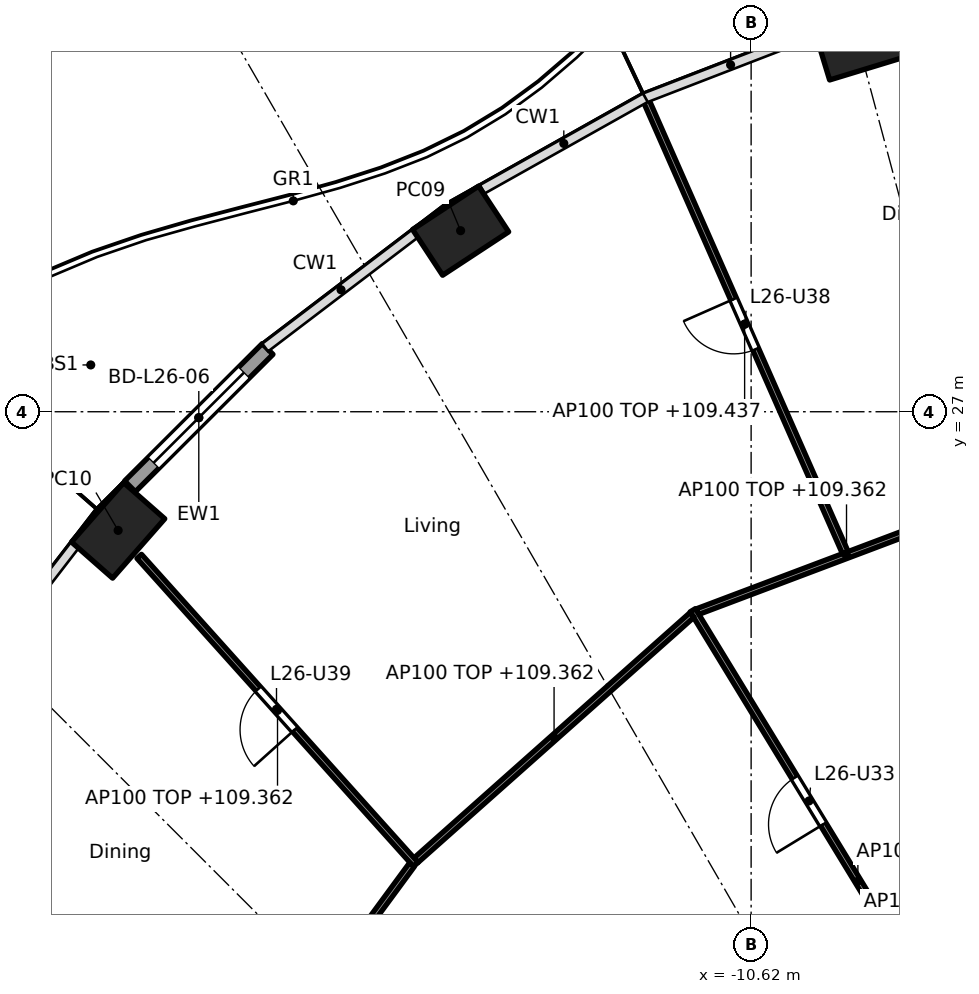
"""IFC4 building model, lengths in metres.
Left out: names, types, materials, properties, quantities, classifications, styles, units other than length and angle.
Written with IfcOpenShell. Run it as: python <this file> out.ifc"""

import sys

from ifc_helpers import new_model, si_unit, direction, frame, frame_2d, origin, origin_2d, place, context, subcontext, project, spatial, rectangle, hollow_rectangle, extrude, element, fill, save


model = new_model("IFC4")
c1 = context("Model", 3, precision=1e-05, world=origin(), true_north=direction((0.0, 1.0)))
c2 = subcontext(c1, "Body", "Model", "MODEL_VIEW")
j1 = project(units=[si_unit("LENGTHUNIT", "METRE"), si_unit("PLANEANGLEUNIT", "RADIAN")], contexts=[c1])
p1 = place(None, origin())
s1 = spatial("IfcSite", under=j1, at=p1, CompositionType="ELEMENT")
p2 = place(p1, origin())
s2 = spatial("IfcBuilding", under=s1, at=p2, CompositionType="ELEMENT")
p3 = place(p2, frame((0.0, 0.0, 106.6)))
s3 = spatial("IfcBuildingStorey", under=s2, at=p3, CompositionType="ELEMENT", Elevation=106.6)
for number, where, z_axis, x_axis in (
    (1, (-8.839, 33.076, 0.0), (0.0, 0.0, 1.0), (-0.957, -0.292, 0.0)),
    (2, (-15.397, 29.978, 0.0), (0.0, 0.0, 1.0), (-0.836, -0.549, 0.0)),
    (3, (-21.03, 25.049, 0.0), (0.0, 0.0, 1.0), (-0.66, -0.751, 0.0)),
):
    element("IfcColumn", number, at=place(p3, frame(where, z_axis=z_axis, x_axis=x_axis)), inside=s3, PredefinedType="COLUMN", context=c2, shape_type="SweptSolid", body=[
        extrude(hollow_rectangle(XDim=1.3, YDim=0.9, WallThickness=0.045, at=origin_2d()), origin(), (0.0, 0.0, 1.0), 3.7),
    ])
p4 = place(p3, frame((-20.835, 25.773, 0.0), z_axis=(0.0, 0.0, 1.0), x_axis=(0.707831646613, 0.706381171927, 0.0)))
e4 = element("IfcWall", 4, at=p4, inside=s3, PredefinedType="SOLIDWALL", context=c2, shape_type="SweptSolid", body=[
    extrude(rectangle(XDim=3.198, YDim=0.25, at=frame_2d((1.599, 0.0))), origin(), (0.0, 0.0, 1.0), 3.44),
])
p5 = place(p4, frame((0.549, 0.0, 0.0)))
e5 = element("IfcOpeningElement", 5, at=p5, cuts=e4, PredefinedType="OPENING", context=c2, shape_type="SweptSolid", body=[
    extrude(rectangle(XDim=2.1, YDim=2.4, at=frame_2d((1.05, 1.2))), frame((0.0, 0.135, 0.0), z_axis=(0.0, -1.0, 0.0), x_axis=(1.0, 0.0, 0.0)), (0.0, 0.0, 1.0), 0.27),
])
p6 = place(p3, frame((-6.596, 25.563, 0.0), z_axis=(0.0, 0.0, 1.0), x_axis=(-0.9356162121, -0.353018843201, 0.0)))
e6 = element("IfcWall", 6, at=p6, inside=s3, PredefinedType="PARTITIONING", context=c2, shape_type="SweptSolid", body=[
    extrude(rectangle(XDim=5.249, YDim=0.1, at=frame_2d((2.625, 0.0))), origin(), (0.0, 0.0, 1.0), 2.762),
])
p7 = place(p3, frame((-9.072, 24.683, 0.0), z_axis=(0.0, 0.0, 1.0), x_axis=(-0.403192911159, 0.915115007194, 0.0)))
e7 = element("IfcWall", 7, at=p7, inside=s3, PredefinedType="PARTITIONING", context=c2, shape_type="SweptSolid", body=[
    extrude(rectangle(XDim=8.211, YDim=0.1, at=frame_2d((4.106, 0.0))), origin(), (0.0, 0.0, 1.0), 2.837),
])
p8 = place(p7, frame((3.656, 0.0, 0.0)))
e8 = element("IfcOpeningElement", 8, at=p8, cuts=e7, PredefinedType="OPENING", context=c2, shape_type="SweptSolid", body=[
    extrude(rectangle(XDim=0.9, YDim=2.1, at=frame_2d((0.45, 1.05))), frame((0.0, 0.06, 0.0), z_axis=(0.0, -1.0, 0.0), x_axis=(1.0, 0.0, 0.0)), (0.0, 0.0, 1.0), 0.12),
])
p9 = place(p3, frame((-6.149, 14.825, 0.0), z_axis=(0.0, 0.0, 1.0), x_axis=(-0.520411490252, 0.853915616917, 0.0)))
e9 = element("IfcWall", 9, at=p9, inside=s3, PredefinedType="PARTITIONING", context=c2, shape_type="SweptSolid", body=[
    extrude(rectangle(XDim=10.435, YDim=0.1, at=frame_2d((5.218, 0.0))), origin(), (0.0, 0.0, 1.0), 3.44),
])
p10 = place(p9, frame((1.582, 0.0, 0.0)))
e10 = element("IfcOpeningElement", 10, at=p10, cuts=e9, PredefinedType="OPENING", context=c2, shape_type="SweptSolid", body=[
    extrude(rectangle(XDim=0.9, YDim=2.1, at=frame_2d((0.45, 1.05))), frame((0.0, 0.06, 0.0), z_axis=(0.0, -1.0, 0.0), x_axis=(1.0, 0.0, 0.0)), (0.0, 0.0, 1.0), 0.12),
])
p11 = place(p9, frame((6.312, 0.0, 0.0)))
e11 = element("IfcOpeningElement", 11, at=p11, cuts=e9, PredefinedType="OPENING", context=c2, shape_type="SweptSolid", body=[
    extrude(rectangle(XDim=0.9, YDim=2.1, at=frame_2d((0.45, 1.05))), frame((0.0, 0.06, 0.0), z_axis=(0.0, -1.0, 0.0), x_axis=(1.0, 0.0, 0.0)), (0.0, 0.0, 1.0), 0.12),
])
p12 = place(p3, frame((-11.591, 23.66, 0.0), z_axis=(0.0, 0.0, 1.0), x_axis=(-0.747429278403, -0.664341383466, 0.0)))
e12 = element("IfcWall", 12, at=p12, inside=s3, PredefinedType="PARTITIONING", context=c2, shape_type="SweptSolid", body=[
    extrude(rectangle(XDim=6.073, YDim=0.1, at=frame_2d((3.037, 0.0))), origin(), (0.0, 0.0, 1.0), 2.762),
])
p13 = place(p3, frame((-16.134, 19.554, 0.0), z_axis=(0.0, 0.0, 1.0), x_axis=(-0.667985610263, 0.74417418961, 0.0)))
e13 = element("IfcWall", 13, at=p13, inside=s3, PredefinedType="PARTITIONING", context=c2, shape_type="SweptSolid", body=[
    extrude(rectangle(XDim=6.809, YDim=0.1, at=frame_2d((3.405, 0.0))), origin(), (0.0, 0.0, 1.0), 2.762),
])
p14 = place(p13, frame((2.98, 0.0, 0.0)))
e14 = element("IfcOpeningElement", 14, at=p14, cuts=e13, PredefinedType="OPENING", context=c2, shape_type="SweptSolid", body=[
    extrude(rectangle(XDim=0.9, YDim=2.1, at=frame_2d((0.45, 1.05))), frame((0.0, 0.06, 0.0), z_axis=(0.0, -1.0, 0.0), x_axis=(1.0, 0.0, 0.0)), (0.0, 0.0, 1.0), 0.12),
])
p15 = place(p3, frame((-16.197, 19.551, 0.0), z_axis=(0.0, 0.0, 1.0), x_axis=(-0.592391983588, -0.80564988536, 0.0)))
e15 = element("IfcWall", 15, at=p15, inside=s3, PredefinedType="PARTITIONING", context=c2, shape_type="SweptSolid", body=[
    extrude(rectangle(XDim=6.08, YDim=0.1, at=frame_2d((3.04, 0.0))), origin(), (0.0, 0.0, 1.0), 2.762),
])
p16 = place(p5, origin())
e16 = element("IfcDoor", 16, at=p16, inside=s3, OperationType="SLIDING_TO_LEFT", PredefinedType="DOOR", context=c2, shape_type="SweptSolid", body=[
    extrude(rectangle(XDim=2.1, YDim=2.4, at=frame_2d((1.05, 1.2))), frame((0.0, 0.025, 0.0), z_axis=(0.0, -1.0, 0.0), x_axis=(1.0, 0.0, 0.0)), (0.0, 0.0, 1.0), 0.05),
])
fill(e5, e16)
p17 = place(p11, origin())
e17 = element("IfcDoor", 17, at=p17, inside=s3, OperationType="SINGLE_SWING_LEFT", PredefinedType="DOOR", context=c2, shape_type="SweptSolid", body=[
    extrude(rectangle(XDim=0.9, YDim=2.1, at=frame_2d((0.45, 1.05))), frame((0.0, 0.025, 0.0), z_axis=(0.0, -1.0, 0.0), x_axis=(1.0, 0.0, 0.0)), (0.0, 0.0, 1.0), 0.05),
])
fill(e11, e17)
p18 = place(p8, origin())
e18 = element("IfcDoor", 18, at=p18, inside=s3, OperationType="SINGLE_SWING_RIGHT", PredefinedType="DOOR", context=c2, shape_type="SweptSolid", body=[
    extrude(rectangle(XDim=0.9, YDim=2.1, at=frame_2d((0.45, 1.05))), frame((0.0, 0.025, 0.0), z_axis=(0.0, -1.0, 0.0), x_axis=(1.0, 0.0, 0.0)), (0.0, 0.0, 1.0), 0.05),
])
fill(e8, e18)
p19 = place(p14, origin())
e19 = element("IfcDoor", 19, at=p19, inside=s3, OperationType="SINGLE_SWING_LEFT", PredefinedType="DOOR", context=c2, shape_type="SweptSolid", body=[
    extrude(rectangle(XDim=0.9, YDim=2.1, at=frame_2d((0.45, 1.05))), frame((0.0, 0.025, 0.0), z_axis=(0.0, -1.0, 0.0), x_axis=(1.0, 0.0, 0.0)), (0.0, 0.0, 1.0), 0.05),
])
fill(e14, e19)
save(model, sys.argv[1])
